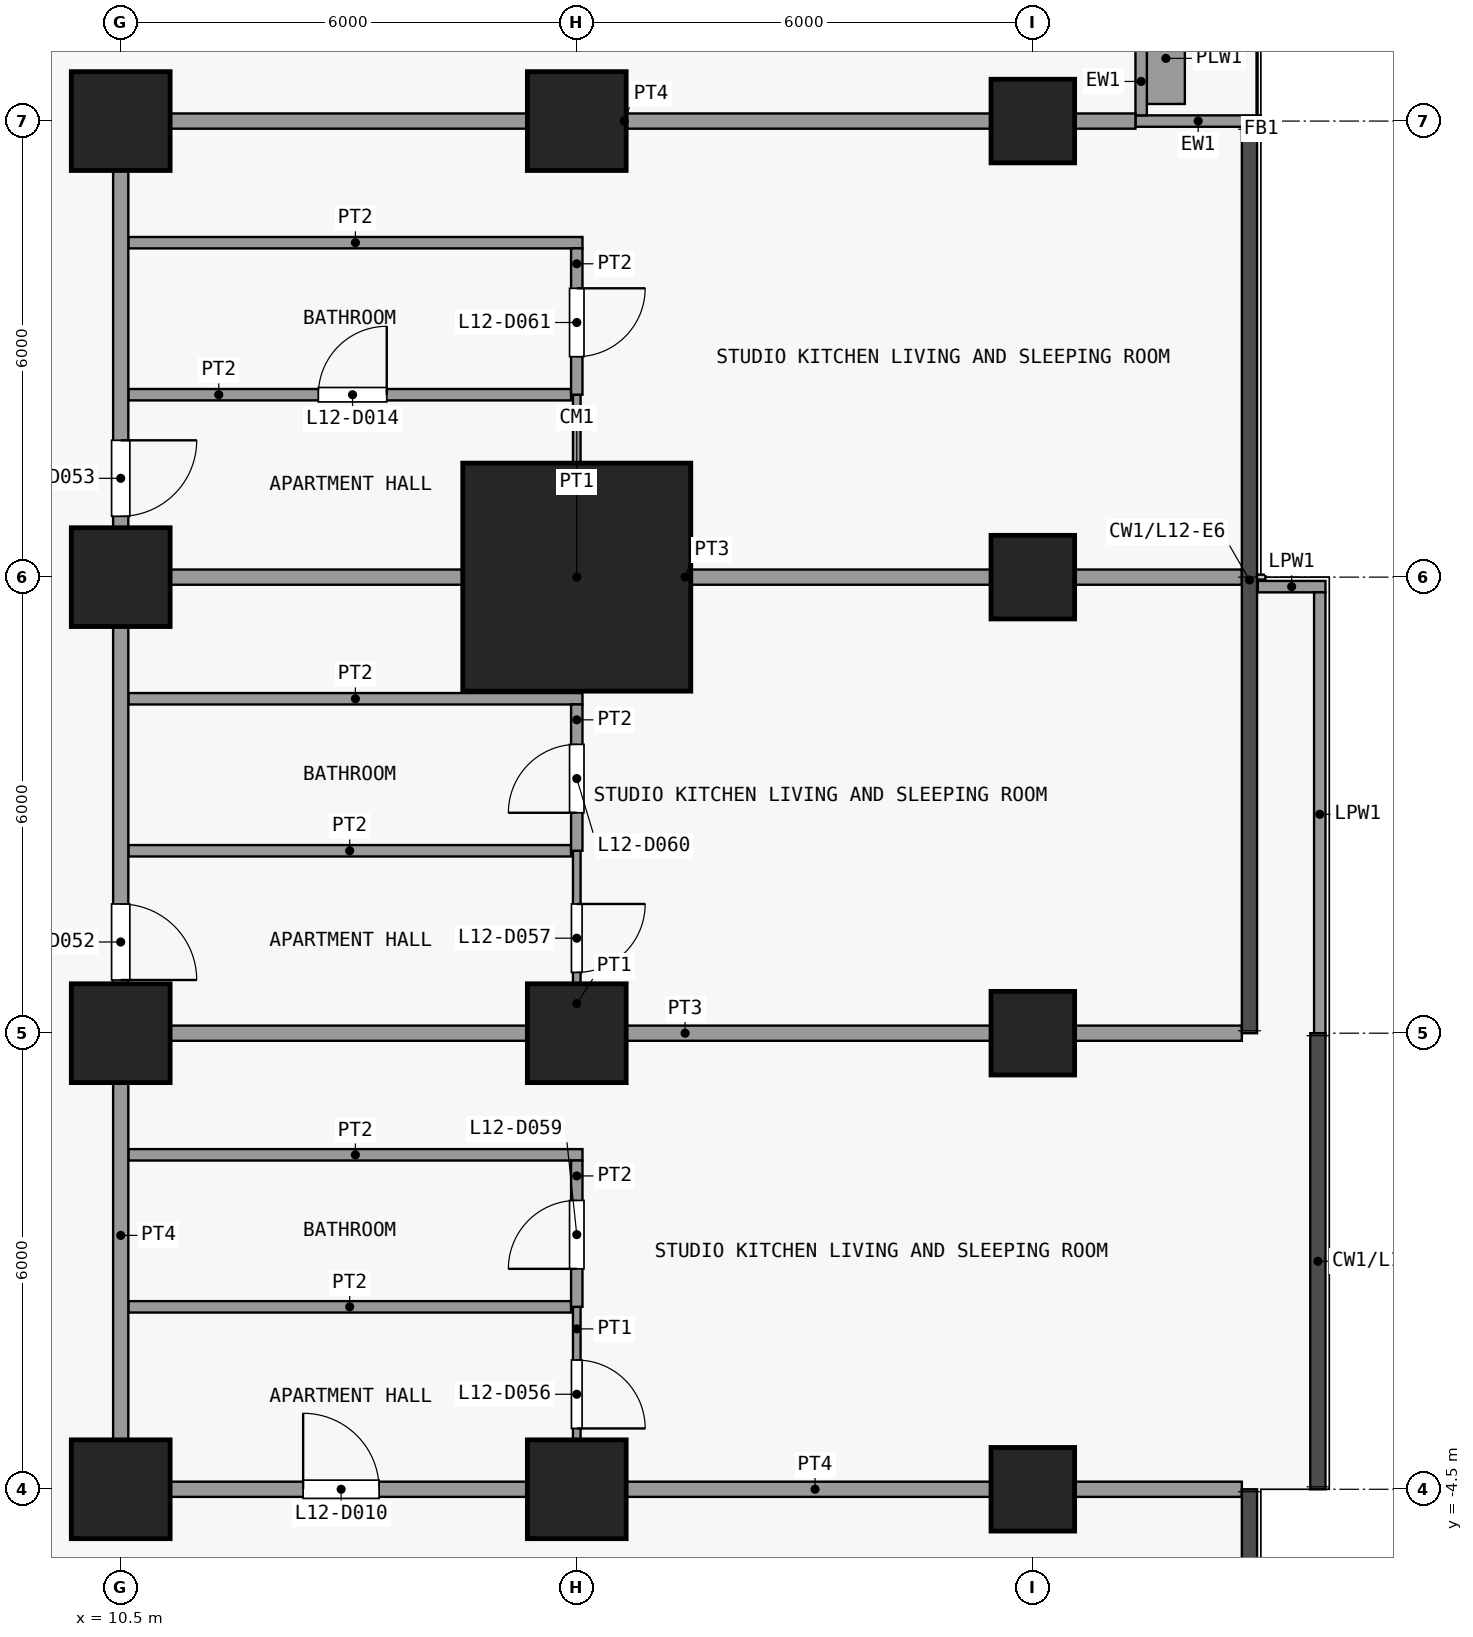
"""IFC4 building model, lengths in metres.
Left out: names, types, materials, properties, quantities, classifications, styles, units other than length and angle.
Written with IfcOpenShell. Run it as: python <this file> out.ifc"""

import sys

from ifc_helpers import new_model, si_unit, direction, frame, frame_2d, origin, origin_2d, place, context, subcontext, project, spatial, rectangle, extrude, element, fill, save


model = new_model("IFC4")
c1 = context("Model", 3, precision=1e-05, world=origin(), true_north=direction((0.0, 1.0)))
c2 = subcontext(c1, "Body", "Model", "MODEL_VIEW")
j1 = project(units=[si_unit("LENGTHUNIT", "METRE"), si_unit("PLANEANGLEUNIT", "RADIAN")], contexts=[c1])
p1 = place(None, origin())
s1 = spatial("IfcSite", under=j1, at=p1, CompositionType="ELEMENT")
p2 = place(p1, origin())
s2 = spatial("IfcBuilding", under=s1, at=p2, CompositionType="ELEMENT")
p3 = place(p2, frame((0.0, 0.0, 54.1)))
s3 = spatial("IfcBuildingStorey", under=s2, at=p3, CompositionType="ELEMENT", Elevation=54.1)
for number, where, z_axis, x_axis in (
    (1, (10.5, -4.5, 0.0), (0.0, 0.0, 1.0), (1.0, 0.0, 0.0)),
    (2, (10.5, 1.5, 0.0), (0.0, 0.0, 1.0), (1.0, 0.0, 0.0)),
    (3, (10.5, 7.5, 0.0), (0.0, 0.0, 1.0), (1.0, 0.0, 0.0)),
    (4, (10.5, 13.5, 0.0), (0.0, 0.0, 1.0), (1.0, 0.0, 0.0)),
    (5, (16.5, -4.5, 0.0), (0.0, 0.0, 1.0), (1.0, 0.0, 0.0)),
    (6, (16.5, 1.5, 0.0), (0.0, 0.0, 1.0), (1.0, 0.0, 0.0)),
):
    element("IfcColumn", number, at=place(p3, frame(where, z_axis=z_axis, x_axis=x_axis)), inside=s3, PredefinedType="COLUMN", context=c2, shape_type="SweptSolid", body=[
        extrude(rectangle(XDim=1.3, YDim=1.3, at=origin_2d()), origin(), (0.0, 0.0, 1.0), 3.6),
    ])
p4 = place(p3, frame((16.5, 7.5, 0.0), z_axis=(0.0, 0.0, 1.0), x_axis=(1.0, 0.0, 0.0)))
e7 = element("IfcColumn", 7, at=p4, inside=s3, PredefinedType="COLUMN", context=c2, shape_type="SweptSolid", body=[
    extrude(rectangle(XDim=3.0, YDim=3.0, at=origin_2d()), origin(), (0.0, 0.0, 1.0), 3.6),
])
p5 = place(p3, frame((16.5, 13.5, 0.0), z_axis=(0.0, 0.0, 1.0), x_axis=(1.0, 0.0, 0.0)))
e8 = element("IfcColumn", 8, at=p5, inside=s3, PredefinedType="COLUMN", context=c2, shape_type="SweptSolid", body=[
    extrude(rectangle(XDim=1.3, YDim=1.3, at=origin_2d()), origin(), (0.0, 0.0, 1.0), 3.6),
])
for number, where, z_axis, x_axis in (
    (9, (22.5, -4.5, 0.0), (0.0, 0.0, 1.0), (1.0, 0.0, 0.0)),
    (10, (22.5, 1.5, 0.0), (0.0, 0.0, 1.0), (1.0, 0.0, 0.0)),
    (11, (22.5, 7.5, 0.0), (0.0, 0.0, 1.0), (1.0, 0.0, 0.0)),
    (12, (22.5, 13.5, 0.0), (0.0, 0.0, 1.0), (1.0, 0.0, 0.0)),
):
    element("IfcColumn", number, at=place(p3, frame(where, z_axis=z_axis, x_axis=x_axis)), inside=s3, PredefinedType="COLUMN", context=c2, shape_type="SweptSolid", body=[
        extrude(rectangle(XDim=1.1, YDim=1.1, at=origin_2d()), origin(), (0.0, 0.0, 1.0), 3.6),
    ])
p6 = place(p3, frame((23.85, 13.5, 0.0), z_axis=(0.0, 0.0, 1.0), x_axis=(1.0, 0.0, 0.0)))
e13 = element("IfcWall", 13, at=p6, inside=s3, PredefinedType="SOLIDWALL", context=c2, shape_type="SweptSolid", body=[
    extrude(rectangle(XDim=1.65, YDim=0.15, at=frame_2d((0.825, 0.0))), origin(), (0.0, 0.0, 1.0), 3.3),
])
p7 = place(p3, frame((23.925, 19.425, 0.0), z_axis=(0.0, 0.0, 1.0), x_axis=(0.0, -1.0, 0.0)))
e14 = element("IfcWall", 14, at=p7, inside=s3, PredefinedType="SOLIDWALL", context=c2, shape_type="SweptSolid", body=[
    extrude(rectangle(XDim=5.85, YDim=0.15, at=frame_2d((2.925, 0.0))), origin(), (0.0, 0.0, 1.0), 3.3),
])
p8 = place(p7, frame((0.825, 0.0, 0.0)))
e15 = element("IfcOpeningElement", 15, at=p8, cuts=e14, PredefinedType="OPENING", context=c2, shape_type="SweptSolid", body=[
    extrude(rectangle(XDim=1.2, YDim=2.4, at=frame_2d((0.6, 1.2))), frame((0.0, 0.085, 0.0), z_axis=(0.0, -1.0, 0.0), x_axis=(1.0, 0.0, 0.0)), (0.0, 0.0, 1.0), 0.17),
])
p9 = place(p7, frame((3.038, 0.0, 0.9)))
e16 = element("IfcOpeningElement", 16, at=p9, cuts=e14, PredefinedType="OPENING", context=c2, shape_type="SweptSolid", body=[
    extrude(rectangle(XDim=1.8, YDim=2.1, at=frame_2d((0.9, 1.05))), frame((0.0, 0.085, 0.0), z_axis=(0.0, -1.0, 0.0), x_axis=(1.0, 0.0, 0.0)), (0.0, 0.0, 1.0), 0.17),
])
p10 = place(p3, frame((24.25, 13.725, 0.0), z_axis=(0.0, 0.0, 1.0), x_axis=(0.0, 1.0, 0.0)))
e17 = element("IfcWall", 17, at=p10, inside=s3, PredefinedType="USERDEFINED", context=c2, shape_type="SweptSolid", body=[
    extrude(rectangle(XDim=1.2, YDim=0.5, at=frame_2d((0.6, 0.0))), origin(), (0.0, 0.0, 1.0), 0.9),
])
p11 = place(p3, frame((25.46, 7.375, 0.0), z_axis=(0.0, 0.0, 1.0), x_axis=(1.0, 0.0, 0.0)))
e18 = element("IfcWall", 18, at=p11, inside=s3, PredefinedType="PARAPET", context=c2, shape_type="SweptSolid", body=[
    extrude(rectangle(XDim=0.89, YDim=0.15, at=frame_2d((0.445, 0.0))), origin(), (0.0, 0.0, 1.0), 1.15),
])
p12 = place(p3, frame((26.275, 7.3, 0.0), z_axis=(0.0, 0.0, 1.0), x_axis=(0.0, -1.0, 0.0)))
e19 = element("IfcWall", 19, at=p12, inside=s3, PredefinedType="PARAPET", context=c2, shape_type="SweptSolid", body=[
    extrude(rectangle(XDim=5.84, YDim=0.15, at=frame_2d((2.92, 0.0))), origin(), (0.0, 0.0, 1.0), 1.15),
])
p13 = place(p3, frame((10.4, -4.5, 0.0), z_axis=(0.0, 0.0, 1.0), x_axis=(1.0, 0.0, 0.0)))
e20 = element("IfcWall", 20, at=p13, inside=s3, PredefinedType="PARTITIONING", context=c2, shape_type="SweptSolid", body=[
    extrude(rectangle(XDim=14.85, YDim=0.2, at=frame_2d((7.425, 0.0))), origin(), (0.0, 0.0, 1.0), 3.3),
])
p14 = place(p13, frame((2.5, 0.0, 0.0)))
e21 = element("IfcOpeningElement", 21, at=p14, cuts=e20, PredefinedType="OPENING", context=c2, shape_type="SweptSolid", body=[
    extrude(rectangle(XDim=1.0, YDim=2.1, at=frame_2d((0.5, 1.05))), frame((0.0, 0.11, 0.0), z_axis=(0.0, -1.0, 0.0), x_axis=(1.0, 0.0, 0.0)), (0.0, 0.0, 1.0), 0.22),
])
p15 = place(p3, frame((10.6, -2.1, 0.0), z_axis=(0.0, 0.0, 1.0), x_axis=(1.0, 0.0, 0.0)))
e22 = element("IfcWall", 22, at=p15, inside=s3, PredefinedType="PARTITIONING", context=c2, shape_type="SweptSolid", body=[
    extrude(rectangle(XDim=5.825, YDim=0.15, at=frame_2d((2.913, 0.0))), origin(), (0.0, 0.0, 1.0), 3.3),
])
p16 = place(p3, frame((10.6, -0.1, 0.0), z_axis=(0.0, 0.0, 1.0), x_axis=(1.0, 0.0, 0.0)))
e23 = element("IfcWall", 23, at=p16, inside=s3, PredefinedType="PARTITIONING", context=c2, shape_type="SweptSolid", body=[
    extrude(rectangle(XDim=5.975, YDim=0.15, at=frame_2d((2.987, 0.0))), origin(), (0.0, 0.0, 1.0), 3.3),
])
p17 = place(p3, frame((10.6, 1.5, 0.0), z_axis=(0.0, 0.0, 1.0), x_axis=(1.0, 0.0, 0.0)))
e24 = element("IfcWall", 24, at=p17, inside=s3, PredefinedType="PARTITIONING", context=c2, shape_type="SweptSolid", body=[
    extrude(rectangle(XDim=14.65, YDim=0.2, at=frame_2d((7.325, 0.0))), origin(), (0.0, 0.0, 1.0), 3.3),
])
p18 = place(p3, frame((10.6, 3.9, 0.0), z_axis=(0.0, 0.0, 1.0), x_axis=(1.0, 0.0, 0.0)))
e25 = element("IfcWall", 25, at=p18, inside=s3, PredefinedType="PARTITIONING", context=c2, shape_type="SweptSolid", body=[
    extrude(rectangle(XDim=5.825, YDim=0.15, at=frame_2d((2.913, 0.0))), origin(), (0.0, 0.0, 1.0), 3.3),
])
p19 = place(p3, frame((10.6, 5.9, 0.0), z_axis=(0.0, 0.0, 1.0), x_axis=(1.0, 0.0, 0.0)))
e26 = element("IfcWall", 26, at=p19, inside=s3, PredefinedType="PARTITIONING", context=c2, shape_type="SweptSolid", body=[
    extrude(rectangle(XDim=5.975, YDim=0.15, at=frame_2d((2.987, 0.0))), origin(), (0.0, 0.0, 1.0), 3.3),
])
p20 = place(p3, frame((10.6, 7.5, 0.0), z_axis=(0.0, 0.0, 1.0), x_axis=(1.0, 0.0, 0.0)))
e27 = element("IfcWall", 27, at=p20, inside=s3, PredefinedType="PARTITIONING", context=c2, shape_type="SweptSolid", body=[
    extrude(rectangle(XDim=14.65, YDim=0.2, at=frame_2d((7.325, 0.0))), origin(), (0.0, 0.0, 1.0), 3.3),
])
p21 = place(p3, frame((10.6, 9.9, 0.0), z_axis=(0.0, 0.0, 1.0), x_axis=(1.0, 0.0, 0.0)))
e28 = element("IfcWall", 28, at=p21, inside=s3, PredefinedType="PARTITIONING", context=c2, shape_type="SweptSolid", body=[
    extrude(rectangle(XDim=5.825, YDim=0.15, at=frame_2d((2.913, 0.0))), origin(), (0.0, 0.0, 1.0), 3.3),
])
p22 = place(p21, frame((2.5, 0.0, 0.0)))
e29 = element("IfcOpeningElement", 29, at=p22, cuts=e28, PredefinedType="OPENING", context=c2, shape_type="SweptSolid", body=[
    extrude(rectangle(XDim=0.9, YDim=2.1, at=frame_2d((0.45, 1.05))), frame((0.0, 0.085, 0.0), z_axis=(0.0, -1.0, 0.0), x_axis=(1.0, 0.0, 0.0)), (0.0, 0.0, 1.0), 0.17),
])
p23 = place(p3, frame((10.6, 11.9, 0.0), z_axis=(0.0, 0.0, 1.0), x_axis=(1.0, 0.0, 0.0)))
e30 = element("IfcWall", 30, at=p23, inside=s3, PredefinedType="PARTITIONING", context=c2, shape_type="SweptSolid", body=[
    extrude(rectangle(XDim=5.975, YDim=0.15, at=frame_2d((2.987, 0.0))), origin(), (0.0, 0.0, 1.0), 3.3),
])
p24 = place(p3, frame((10.4, 13.5, 0.0), z_axis=(0.0, 0.0, 1.0), x_axis=(1.0, 0.0, 0.0)))
e31 = element("IfcWall", 31, at=p24, inside=s3, PredefinedType="PARTITIONING", context=c2, shape_type="SweptSolid", body=[
    extrude(rectangle(XDim=13.45, YDim=0.2, at=frame_2d((6.725, 0.0))), origin(), (0.0, 0.0, 1.0), 3.3),
])
p25 = place(p3, frame((10.5, -4.4, 0.0), z_axis=(0.0, 0.0, 1.0), x_axis=(0.0, 1.0, 0.0)))
e32 = element("IfcWall", 32, at=p25, inside=s3, PredefinedType="PARTITIONING", context=c2, shape_type="SweptSolid", body=[
    extrude(rectangle(XDim=17.8, YDim=0.2, at=frame_2d((8.9, 0.0))), origin(), (0.0, 0.0, 1.0), 3.3),
])
p26 = place(p25, frame((6.6, 0.0, 0.0)))
e33 = element("IfcOpeningElement", 33, at=p26, cuts=e32, PredefinedType="OPENING", context=c2, shape_type="SweptSolid", body=[
    extrude(rectangle(XDim=1.0, YDim=2.1, at=frame_2d((0.5, 1.05))), frame((0.0, 0.11, 0.0), z_axis=(0.0, -1.0, 0.0), x_axis=(1.0, 0.0, 0.0)), (0.0, 0.0, 1.0), 0.22),
])
p27 = place(p25, frame((12.7, 0.0, 0.0)))
e34 = element("IfcOpeningElement", 34, at=p27, cuts=e32, PredefinedType="OPENING", context=c2, shape_type="SweptSolid", body=[
    extrude(rectangle(XDim=1.0, YDim=2.1, at=frame_2d((0.5, 1.05))), frame((0.0, 0.11, 0.0), z_axis=(0.0, -1.0, 0.0), x_axis=(1.0, 0.0, 0.0)), (0.0, 0.0, 1.0), 0.22),
])
p28 = place(p3, frame((16.5, -4.4, 0.0), z_axis=(0.0, 0.0, 1.0), x_axis=(0.0, 1.0, 0.0)))
e35 = element("IfcWall", 35, at=p28, inside=s3, PredefinedType="PARTITIONING", context=c2, shape_type="SweptSolid", body=[
    extrude(rectangle(XDim=2.3, YDim=0.1, at=frame_2d((1.15, 0.0))), origin(), (0.0, 0.0, 1.0), 3.3),
])
p29 = place(p28, frame((0.7, 0.0, 0.0)))
e36 = element("IfcOpeningElement", 36, at=p29, cuts=e35, PredefinedType="OPENING", context=c2, shape_type="SweptSolid", body=[
    extrude(rectangle(XDim=0.9, YDim=2.1, at=frame_2d((0.45, 1.05))), frame((0.0, 0.06, 0.0), z_axis=(0.0, -1.0, 0.0), x_axis=(1.0, 0.0, 0.0)), (0.0, 0.0, 1.0), 0.12),
])
p30 = place(p3, frame((16.5, 1.6, 0.0), z_axis=(0.0, 0.0, 1.0), x_axis=(0.0, 1.0, 0.0)))
e37 = element("IfcWall", 37, at=p30, inside=s3, PredefinedType="PARTITIONING", context=c2, shape_type="SweptSolid", body=[
    extrude(rectangle(XDim=2.3, YDim=0.1, at=frame_2d((1.15, 0.0))), origin(), (0.0, 0.0, 1.0), 3.3),
])
p31 = place(p30, frame((0.7, 0.0, 0.0)))
e38 = element("IfcOpeningElement", 38, at=p31, cuts=e37, PredefinedType="OPENING", context=c2, shape_type="SweptSolid", body=[
    extrude(rectangle(XDim=0.9, YDim=2.1, at=frame_2d((0.45, 1.05))), frame((0.0, 0.06, 0.0), z_axis=(0.0, -1.0, 0.0), x_axis=(1.0, 0.0, 0.0)), (0.0, 0.0, 1.0), 0.12),
])
p32 = place(p3, frame((16.5, 7.6, 0.0), z_axis=(0.0, 0.0, 1.0), x_axis=(0.0, 1.0, 0.0)))
e39 = element("IfcWall", 39, at=p32, inside=s3, PredefinedType="PARTITIONING", context=c2, shape_type="SweptSolid", body=[
    extrude(rectangle(XDim=2.3, YDim=0.1, at=frame_2d((1.15, 0.0))), origin(), (0.0, 0.0, 1.0), 3.3),
])
p33 = place(p3, frame((16.5, -2.1, 0.0), z_axis=(0.0, 0.0, 1.0), x_axis=(0.0, 1.0, 0.0)))
e40 = element("IfcWall", 40, at=p33, inside=s3, PredefinedType="PARTITIONING", context=c2, shape_type="SweptSolid", body=[
    extrude(rectangle(XDim=1.925, YDim=0.15, at=frame_2d((0.962, 0.0))), origin(), (0.0, 0.0, 1.0), 3.3),
])
p34 = place(p33, frame((0.5, 0.0, 0.0)))
e41 = element("IfcOpeningElement", 41, at=p34, cuts=e40, PredefinedType="OPENING", context=c2, shape_type="SweptSolid", body=[
    extrude(rectangle(XDim=0.9, YDim=2.1, at=frame_2d((0.45, 1.05))), frame((0.0, 0.085, 0.0), z_axis=(0.0, -1.0, 0.0), x_axis=(1.0, 0.0, 0.0)), (0.0, 0.0, 1.0), 0.17),
])
p35 = place(p3, frame((16.5, 3.9, 0.0), z_axis=(0.0, 0.0, 1.0), x_axis=(0.0, 1.0, 0.0)))
e42 = element("IfcWall", 42, at=p35, inside=s3, PredefinedType="PARTITIONING", context=c2, shape_type="SweptSolid", body=[
    extrude(rectangle(XDim=1.925, YDim=0.15, at=frame_2d((0.962, 0.0))), origin(), (0.0, 0.0, 1.0), 3.3),
])
p36 = place(p35, frame((0.5, 0.0, 0.0)))
e43 = element("IfcOpeningElement", 43, at=p36, cuts=e42, PredefinedType="OPENING", context=c2, shape_type="SweptSolid", body=[
    extrude(rectangle(XDim=0.9, YDim=2.1, at=frame_2d((0.45, 1.05))), frame((0.0, 0.085, 0.0), z_axis=(0.0, -1.0, 0.0), x_axis=(1.0, 0.0, 0.0)), (0.0, 0.0, 1.0), 0.17),
])
p37 = place(p3, frame((16.5, 9.9, 0.0), z_axis=(0.0, 0.0, 1.0), x_axis=(0.0, 1.0, 0.0)))
e44 = element("IfcWall", 44, at=p37, inside=s3, PredefinedType="PARTITIONING", context=c2, shape_type="SweptSolid", body=[
    extrude(rectangle(XDim=1.925, YDim=0.15, at=frame_2d((0.962, 0.0))), origin(), (0.0, 0.0, 1.0), 3.3),
])
p38 = place(p37, frame((0.5, 0.0, 0.0)))
e45 = element("IfcOpeningElement", 45, at=p38, cuts=e44, PredefinedType="OPENING", context=c2, shape_type="SweptSolid", body=[
    extrude(rectangle(XDim=0.9, YDim=2.1, at=frame_2d((0.45, 1.05))), frame((0.0, 0.085, 0.0), z_axis=(0.0, -1.0, 0.0), x_axis=(1.0, 0.0, 0.0)), (0.0, 0.0, 1.0), 0.17),
])
p39 = place(p14, origin())
e46 = element("IfcDoor", 46, at=p39, inside=s3, OperationType="SINGLE_SWING_RIGHT", PredefinedType="DOOR", context=c2, shape_type="SweptSolid", body=[
    extrude(rectangle(XDim=1.0, YDim=2.1, at=frame_2d((0.5, 1.05))), frame((0.0, 0.025, 0.0), z_axis=(0.0, -1.0, 0.0), x_axis=(1.0, 0.0, 0.0)), (0.0, 0.0, 1.0), 0.05),
])
fill(e21, e46)
p40 = place(p22, origin())
e47 = element("IfcDoor", 47, at=p40, inside=s3, OperationType="SINGLE_SWING_LEFT", PredefinedType="DOOR", context=c2, shape_type="SweptSolid", body=[
    extrude(rectangle(XDim=0.9, YDim=2.1, at=frame_2d((0.45, 1.05))), frame((0.0, 0.025, 0.0), z_axis=(0.0, -1.0, 0.0), x_axis=(1.0, 0.0, 0.0)), (0.0, 0.0, 1.0), 0.05),
])
fill(e29, e47)
p41 = place(p26, origin())
e48 = element("IfcDoor", 48, at=p41, inside=s3, OperationType="SINGLE_SWING_LEFT", PredefinedType="DOOR", context=c2, shape_type="SweptSolid", body=[
    extrude(rectangle(XDim=1.0, YDim=2.1, at=frame_2d((0.5, 1.05))), frame((0.0, 0.025, 0.0), z_axis=(0.0, -1.0, 0.0), x_axis=(1.0, 0.0, 0.0)), (0.0, 0.0, 1.0), 0.05),
])
fill(e33, e48)
p42 = place(p27, origin())
e49 = element("IfcDoor", 49, at=p42, inside=s3, OperationType="SINGLE_SWING_RIGHT", PredefinedType="DOOR", context=c2, shape_type="SweptSolid", body=[
    extrude(rectangle(XDim=1.0, YDim=2.1, at=frame_2d((0.5, 1.05))), frame((0.0, 0.025, 0.0), z_axis=(0.0, -1.0, 0.0), x_axis=(1.0, 0.0, 0.0)), (0.0, 0.0, 1.0), 0.05),
])
fill(e34, e49)
p43 = place(p29, origin())
e50 = element("IfcDoor", 50, at=p43, inside=s3, OperationType="SINGLE_SWING_LEFT", PredefinedType="DOOR", context=c2, shape_type="SweptSolid", body=[
    extrude(rectangle(XDim=0.9, YDim=2.1, at=frame_2d((0.45, 1.05))), frame((0.0, 0.025, 0.0), z_axis=(0.0, -1.0, 0.0), x_axis=(1.0, 0.0, 0.0)), (0.0, 0.0, 1.0), 0.05),
])
fill(e36, e50)
p44 = place(p31, origin())
e51 = element("IfcDoor", 51, at=p44, inside=s3, OperationType="SINGLE_SWING_RIGHT", PredefinedType="DOOR", context=c2, shape_type="SweptSolid", body=[
    extrude(rectangle(XDim=0.9, YDim=2.1, at=frame_2d((0.45, 1.05))), frame((0.0, 0.025, 0.0), z_axis=(0.0, -1.0, 0.0), x_axis=(1.0, 0.0, 0.0)), (0.0, 0.0, 1.0), 0.05),
])
fill(e38, e51)
p45 = place(p34, origin())
e52 = element("IfcDoor", 52, at=p45, inside=s3, OperationType="SINGLE_SWING_RIGHT", PredefinedType="DOOR", context=c2, shape_type="SweptSolid", body=[
    extrude(rectangle(XDim=0.9, YDim=2.1, at=frame_2d((0.45, 1.05))), frame((0.0, 0.025, 0.0), z_axis=(0.0, -1.0, 0.0), x_axis=(1.0, 0.0, 0.0)), (0.0, 0.0, 1.0), 0.05),
])
fill(e41, e52)
p46 = place(p36, origin())
e53 = element("IfcDoor", 53, at=p46, inside=s3, OperationType="SINGLE_SWING_RIGHT", PredefinedType="DOOR", context=c2, shape_type="SweptSolid", body=[
    extrude(rectangle(XDim=0.9, YDim=2.1, at=frame_2d((0.45, 1.05))), frame((0.0, 0.025, 0.0), z_axis=(0.0, -1.0, 0.0), x_axis=(1.0, 0.0, 0.0)), (0.0, 0.0, 1.0), 0.05),
])
fill(e43, e53)
p47 = place(p38, origin())
e54 = element("IfcDoor", 54, at=p47, inside=s3, OperationType="SINGLE_SWING_RIGHT", PredefinedType="DOOR", context=c2, shape_type="SweptSolid", body=[
    extrude(rectangle(XDim=0.9, YDim=2.1, at=frame_2d((0.45, 1.05))), frame((0.0, 0.025, 0.0), z_axis=(0.0, -1.0, 0.0), x_axis=(1.0, 0.0, 0.0)), (0.0, 0.0, 1.0), 0.05),
])
fill(e45, e54)
save(model, sys.argv[1])
